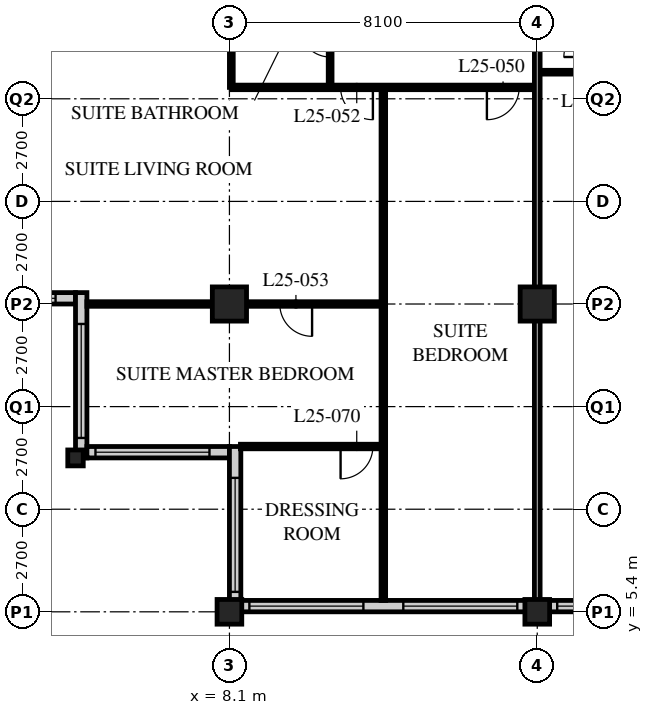
"""IFC4 building model, lengths in metres.
Left out: names, types, materials, properties, quantities, classifications, styles, units other than length and angle.
Written with IfcOpenShell. Run it as: python <this file> out.ifc"""

import sys

from ifc_helpers import new_model, si_unit, direction, frame, frame_2d, origin, origin_2d, place, context, subcontext, project, spatial, rectangle, hollow_rectangle, i_section, extrude, element, fill, save


model = new_model("IFC4")
c1 = context("Model", 3, precision=1e-05, world=origin(), true_north=direction((0.0, 1.0)))
c2 = subcontext(c1, "Body", "Model", "MODEL_VIEW")
j1 = project(units=[si_unit("LENGTHUNIT", "METRE"), si_unit("PLANEANGLEUNIT", "RADIAN")], contexts=[c1])
p1 = place(None, origin())
s1 = spatial("IfcSite", under=j1, at=p1, CompositionType="ELEMENT")
p2 = place(p1, origin())
s2 = spatial("IfcBuilding", under=s1, at=p2, CompositionType="ELEMENT")
p3 = place(p2, frame((0.0, 0.0, 103.4)))
s3 = spatial("IfcBuildingStorey", under=s2, at=p3, CompositionType="ELEMENT", Elevation=103.4)
p4 = place(p3, frame((4.05, 9.45, 0.0), z_axis=(0.0, 0.0, 1.0), x_axis=(1.0, 0.0, 0.0)))
e1 = element("IfcColumn", 1, at=p4, inside=s3, PredefinedType="COLUMN", context=c2, shape_type="SweptSolid", body=[
    extrude(i_section(OverallWidth=0.407, OverallDepth=0.419, WebThickness=0.031, FlangeThickness=0.049, FilletRadius=0.015, at=origin_2d()), origin(), (0.0, 0.0, 1.0), 3.4),
])
p5 = place(p3, frame((8.1, 5.4, 0.0), z_axis=(0.0, 0.0, 1.0), x_axis=(1.0, 0.0, 0.0)))
e2 = element("IfcColumn", 2, at=p5, inside=s3, PredefinedType="COLUMN", context=c2, shape_type="SweptSolid", body=[
    extrude(hollow_rectangle(XDim=0.65, YDim=0.65, WallThickness=0.055, at=origin_2d()), origin(), (0.0, 0.0, 1.0), 3.4),
])
p6 = place(p3, frame((8.1, 13.5, 0.0), z_axis=(0.0, 0.0, 1.0), x_axis=(1.0, 0.0, 0.0)))
e3 = element("IfcColumn", 3, at=p6, inside=s3, PredefinedType="COLUMN", context=c2, shape_type="SweptSolid", body=[
    extrude(hollow_rectangle(XDim=0.9, YDim=0.9, WallThickness=0.1, at=origin_2d()), origin(), (0.0, 0.0, 1.0), 3.4),
])
p7 = place(p3, frame((16.2, 5.4, 0.0), z_axis=(0.0, 0.0, 1.0), x_axis=(1.0, 0.0, 0.0)))
e4 = element("IfcColumn", 4, at=p7, inside=s3, PredefinedType="COLUMN", context=c2, shape_type="SweptSolid", body=[
    extrude(hollow_rectangle(XDim=0.65, YDim=0.65, WallThickness=0.055, at=origin_2d()), origin(), (0.0, 0.0, 1.0), 3.4),
])
p8 = place(p3, frame((16.2, 13.5, 0.0), z_axis=(0.0, 0.0, 1.0), x_axis=(1.0, 0.0, 0.0)))
e5 = element("IfcColumn", 5, at=p8, inside=s3, PredefinedType="COLUMN", context=c2, shape_type="SweptSolid", body=[
    extrude(hollow_rectangle(XDim=0.9, YDim=0.9, WallThickness=0.1, at=origin_2d()), origin(), (0.0, 0.0, 1.0), 3.4),
])
p9 = place(p3, frame((8.4, 5.55, 0.0), z_axis=(0.0, 0.0, 1.0), x_axis=(1.0, 0.0, 0.0)))
e6 = element("IfcWall", 6, at=p9, inside=s3, PredefinedType="SOLIDWALL", context=c2, shape_type="SweptSolid", body=[
    extrude(rectangle(XDim=40.2, YDim=0.3, at=frame_2d((20.1, 0.0))), origin(), (0.0, 0.0, 1.0), 3.19),
])
p10 = place(p9, frame((0.225, 0.0, 0.9)))
e7 = element("IfcOpeningElement", 7, at=p10, cuts=e6, PredefinedType="OPENING", context=c2, shape_type="SweptSolid", body=[
    extrude(rectangle(XDim=3.0, YDim=2.0, at=frame_2d((1.5, 1.0))), frame((0.0, 0.16, 0.0), z_axis=(0.0, -1.0, 0.0), x_axis=(1.0, 0.0, 0.0)), (0.0, 0.0, 1.0), 0.32),
])
p11 = place(p9, frame((4.275, 0.0, 0.9)))
e8 = element("IfcOpeningElement", 8, at=p11, cuts=e6, PredefinedType="OPENING", context=c2, shape_type="SweptSolid", body=[
    extrude(rectangle(XDim=3.0, YDim=2.0, at=frame_2d((1.5, 1.0))), frame((0.0, 0.16, 0.0), z_axis=(0.0, -1.0, 0.0), x_axis=(1.0, 0.0, 0.0)), (0.0, 0.0, 1.0), 0.32),
])
p12 = place(p9, frame((8.325, 0.0, 0.9)))
e9 = element("IfcOpeningElement", 9, at=p12, cuts=e6, PredefinedType="OPENING", context=c2, shape_type="SweptSolid", body=[
    extrude(rectangle(XDim=3.0, YDim=2.0, at=frame_2d((1.5, 1.0))), frame((0.0, 0.16, 0.0), z_axis=(0.0, -1.0, 0.0), x_axis=(1.0, 0.0, 0.0)), (0.0, 0.0, 1.0), 0.32),
])
p13 = place(p9, frame((12.375, 0.0, 0.9)))
e10 = element("IfcOpeningElement", 10, at=p13, cuts=e6, PredefinedType="OPENING", context=c2, shape_type="SweptSolid", body=[
    extrude(rectangle(XDim=3.0, YDim=2.0, at=frame_2d((1.5, 1.0))), frame((0.0, 0.16, 0.0), z_axis=(0.0, -1.0, 0.0), x_axis=(1.0, 0.0, 0.0)), (0.0, 0.0, 1.0), 0.32),
])
p14 = place(p9, frame((16.425, 0.0, 0.9)))
e11 = element("IfcOpeningElement", 11, at=p14, cuts=e6, PredefinedType="OPENING", context=c2, shape_type="SweptSolid", body=[
    extrude(rectangle(XDim=3.0, YDim=2.0, at=frame_2d((1.5, 1.0))), frame((0.0, 0.16, 0.0), z_axis=(0.0, -1.0, 0.0), x_axis=(1.0, 0.0, 0.0)), (0.0, 0.0, 1.0), 0.32),
])
p15 = place(p9, frame((20.475, 0.0, 0.9)))
e12 = element("IfcOpeningElement", 12, at=p15, cuts=e6, PredefinedType="OPENING", context=c2, shape_type="SweptSolid", body=[
    extrude(rectangle(XDim=3.0, YDim=2.0, at=frame_2d((1.5, 1.0))), frame((0.0, 0.16, 0.0), z_axis=(0.0, -1.0, 0.0), x_axis=(1.0, 0.0, 0.0)), (0.0, 0.0, 1.0), 0.32),
])
p16 = place(p9, frame((24.525, 0.0, 0.9)))
e13 = element("IfcOpeningElement", 13, at=p16, cuts=e6, PredefinedType="OPENING", context=c2, shape_type="SweptSolid", body=[
    extrude(rectangle(XDim=3.0, YDim=2.0, at=frame_2d((1.5, 1.0))), frame((0.0, 0.16, 0.0), z_axis=(0.0, -1.0, 0.0), x_axis=(1.0, 0.0, 0.0)), (0.0, 0.0, 1.0), 0.32),
])
p17 = place(p9, frame((28.575, 0.0, 0.9)))
e14 = element("IfcOpeningElement", 14, at=p17, cuts=e6, PredefinedType="OPENING", context=c2, shape_type="SweptSolid", body=[
    extrude(rectangle(XDim=3.0, YDim=2.0, at=frame_2d((1.5, 1.0))), frame((0.0, 0.16, 0.0), z_axis=(0.0, -1.0, 0.0), x_axis=(1.0, 0.0, 0.0)), (0.0, 0.0, 1.0), 0.32),
])
p18 = place(p9, frame((32.625, 0.0, 0.9)))
e15 = element("IfcOpeningElement", 15, at=p18, cuts=e6, PredefinedType="OPENING", context=c2, shape_type="SweptSolid", body=[
    extrude(rectangle(XDim=3.0, YDim=2.0, at=frame_2d((1.5, 1.0))), frame((0.0, 0.16, 0.0), z_axis=(0.0, -1.0, 0.0), x_axis=(1.0, 0.0, 0.0)), (0.0, 0.0, 1.0), 0.32),
])
p19 = place(p9, frame((36.675, 0.0, 0.9)))
e16 = element("IfcOpeningElement", 16, at=p19, cuts=e6, PredefinedType="OPENING", context=c2, shape_type="SweptSolid", body=[
    extrude(rectangle(XDim=3.0, YDim=2.0, at=frame_2d((1.5, 1.0))), frame((0.0, 0.16, 0.0), z_axis=(0.0, -1.0, 0.0), x_axis=(1.0, 0.0, 0.0)), (0.0, 0.0, 1.0), 0.32),
])
p20 = place(p3, frame((0.3, 13.65, 0.0), z_axis=(0.0, 0.0, 1.0), x_axis=(1.0, 0.0, 0.0)))
e17 = element("IfcWall", 17, at=p20, inside=s3, PredefinedType="SOLIDWALL", context=c2, shape_type="SweptSolid", body=[
    extrude(rectangle(XDim=3.75, YDim=0.3, at=frame_2d((1.875, 0.0))), origin(), (0.0, 0.0, 1.0), 3.19),
])
p21 = place(p20, frame((0.225, 0.0, 0.9)))
e18 = element("IfcOpeningElement", 18, at=p21, cuts=e17, PredefinedType="OPENING", context=c2, shape_type="SweptSolid", body=[
    extrude(rectangle(XDim=3.0, YDim=1.5, at=frame_2d((1.5, 0.75))), frame((0.0, 0.16, 0.0), z_axis=(0.0, -1.0, 0.0), x_axis=(1.0, 0.0, 0.0)), (0.0, 0.0, 1.0), 0.32),
])
p22 = place(p3, frame((4.2, 13.8, 0.0), z_axis=(0.0, 0.0, 1.0), x_axis=(0.0, -1.0, 0.0)))
e19 = element("IfcWall", 19, at=p22, inside=s3, PredefinedType="SOLIDWALL", context=c2, shape_type="SweptSolid", body=[
    extrude(rectangle(XDim=4.35, YDim=0.3, at=frame_2d((2.175, 0.0))), origin(), (0.0, 0.0, 1.0), 3.19),
])
p23 = place(p22, frame((0.825, 0.0, 0.9)))
e20 = element("IfcOpeningElement", 20, at=p23, cuts=e19, PredefinedType="OPENING", context=c2, shape_type="SweptSolid", body=[
    extrude(rectangle(XDim=3.0, YDim=1.5, at=frame_2d((1.5, 0.75))), frame((0.0, 0.16, 0.0), z_axis=(0.0, -1.0, 0.0), x_axis=(1.0, 0.0, 0.0)), (0.0, 0.0, 1.0), 0.32),
])
p24 = place(p3, frame((4.35, 9.6, 0.0), z_axis=(0.0, 0.0, 1.0), x_axis=(1.0, 0.0, 0.0)))
e21 = element("IfcWall", 21, at=p24, inside=s3, PredefinedType="SOLIDWALL", context=c2, shape_type="SweptSolid", body=[
    extrude(rectangle(XDim=3.75, YDim=0.3, at=frame_2d((1.875, 0.0))), origin(), (0.0, 0.0, 1.0), 3.19),
])
p25 = place(p24, frame((0.225, 0.0, 0.9)))
e22 = element("IfcOpeningElement", 22, at=p25, cuts=e21, PredefinedType="OPENING", context=c2, shape_type="SweptSolid", body=[
    extrude(rectangle(XDim=3.0, YDim=1.5, at=frame_2d((1.5, 0.75))), frame((0.0, 0.16, 0.0), z_axis=(0.0, -1.0, 0.0), x_axis=(1.0, 0.0, 0.0)), (0.0, 0.0, 1.0), 0.32),
])
p26 = place(p3, frame((8.25, 9.75, 0.0), z_axis=(0.0, 0.0, 1.0), x_axis=(0.0, -1.0, 0.0)))
e23 = element("IfcWall", 23, at=p26, inside=s3, PredefinedType="SOLIDWALL", context=c2, shape_type="SweptSolid", body=[
    extrude(rectangle(XDim=4.35, YDim=0.3, at=frame_2d((2.175, 0.0))), origin(), (0.0, 0.0, 1.0), 3.19),
])
p27 = place(p26, frame((0.825, 0.0, 0.9)))
e24 = element("IfcOpeningElement", 24, at=p27, cuts=e23, PredefinedType="OPENING", context=c2, shape_type="SweptSolid", body=[
    extrude(rectangle(XDim=3.0, YDim=1.5, at=frame_2d((1.5, 0.75))), frame((0.0, 0.16, 0.0), z_axis=(0.0, -1.0, 0.0), x_axis=(1.0, 0.0, 0.0)), (0.0, 0.0, 1.0), 0.32),
])
p28 = place(p3, frame((16.2, 19.6, 0.0), z_axis=(0.0, 0.0, 1.0), x_axis=(1.0, 0.0, 0.0)))
e25 = element("IfcWall", 25, at=p28, inside=s3, PredefinedType="PARTITIONING", context=c2, shape_type="SweptSolid", body=[
    extrude(rectangle(XDim=1.5, YDim=0.1, at=frame_2d((0.75, 0.0))), origin(), (0.0, 0.0, 1.0), 3.19),
])
p29 = place(p3, frame((10.75, 21.6, 0.0), z_axis=(0.0, 0.0, 1.0), x_axis=(0.0, -1.0, 0.0)))
e26 = element("IfcWall", 26, at=p29, inside=s3, PredefinedType="PARTITIONING", context=c2, shape_type="SweptSolid", body=[
    extrude(rectangle(XDim=2.4, YDim=0.1, at=frame_2d((1.2, 0.0))), origin(), (0.0, 0.0, 1.0), 3.19),
])
p30 = place(p29, frame((0.8, 0.0, 0.0)))
e27 = element("IfcOpeningElement", 27, at=p30, cuts=e26, PredefinedType="OPENING", context=c2, shape_type="SweptSolid", body=[
    extrude(rectangle(XDim=0.8, YDim=2.1, at=frame_2d((0.4, 1.05))), frame((0.0, 0.06, 0.0), z_axis=(0.0, -1.0, 0.0), x_axis=(1.0, 0.0, 0.0)), (0.0, 0.0, 1.0), 0.12),
])
p31 = place(p3, frame((8.15, 21.6, 0.0), z_axis=(0.0, 0.0, 1.0), x_axis=(0.0, -1.0, 0.0)))
e28 = element("IfcWall", 28, at=p31, inside=s3, PredefinedType="PARTITIONING", context=c2, shape_type="SweptSolid", body=[
    extrude(rectangle(XDim=2.4, YDim=0.1, at=frame_2d((1.2, 0.0))), origin(), (0.0, 0.0, 1.0), 2.578),
])
p32 = place(p3, frame((8.15, 19.2, 0.0), z_axis=(0.0, 0.0, 1.0), x_axis=(1.0, 0.0, 0.0)))
e29 = element("IfcWall", 29, at=p32, inside=s3, PredefinedType="PARTITIONING", context=c2, shape_type="SweptSolid", body=[
    extrude(rectangle(XDim=8.05, YDim=0.12, at=frame_2d((4.025, 0.0))), origin(), (0.0, 0.0, 1.0), 3.19),
])
p33 = place(p32, frame((6.725, 0.0, 0.0)))
e30 = element("IfcOpeningElement", 30, at=p33, cuts=e29, PredefinedType="OPENING", context=c2, shape_type="SweptSolid", body=[
    extrude(rectangle(XDim=0.85, YDim=2.1, at=frame_2d((0.425, 1.05))), frame((0.0, 0.07, 0.0), z_axis=(0.0, -1.0, 0.0), x_axis=(1.0, 0.0, 0.0)), (0.0, 0.0, 1.0), 0.14),
])
p34 = place(p32, frame((2.875, 0.0, 0.0)))
e31 = element("IfcOpeningElement", 31, at=p34, cuts=e29, PredefinedType="OPENING", context=c2, shape_type="SweptSolid", body=[
    extrude(rectangle(XDim=0.85, YDim=2.1, at=frame_2d((0.425, 1.05))), frame((0.0, 0.07, 0.0), z_axis=(0.0, -1.0, 0.0), x_axis=(1.0, 0.0, 0.0)), (0.0, 0.0, 1.0), 0.14),
])
p35 = place(p3, frame((12.15, 19.2, 0.0), z_axis=(0.0, 0.0, 1.0), x_axis=(0.0, -1.0, 0.0)))
e32 = element("IfcWall", 32, at=p35, inside=s3, PredefinedType="PARTITIONING", context=c2, shape_type="SweptSolid", body=[
    extrude(rectangle(XDim=13.5, YDim=0.12, at=frame_2d((6.75, 0.0))), origin(), (0.0, 0.0, 1.0), 3.19),
])
p36 = place(p3, frame((12.15, 13.5, 0.0), z_axis=(0.0, 0.0, 1.0), x_axis=(-1.0, 0.0, 0.0)))
e33 = element("IfcWall", 33, at=p36, inside=s3, PredefinedType="PARTITIONING", context=c2, shape_type="SweptSolid", body=[
    extrude(rectangle(XDim=7.8, YDim=0.12, at=frame_2d((3.9, 0.0))), origin(), (0.0, 0.0, 1.0), 2.578),
])
p37 = place(p36, frame((1.875, 0.0, 0.0)))
e34 = element("IfcOpeningElement", 34, at=p37, cuts=e33, PredefinedType="OPENING", context=c2, shape_type="SweptSolid", body=[
    extrude(rectangle(XDim=0.85, YDim=2.1, at=frame_2d((0.425, 1.05))), frame((0.0, 0.07, 0.0), z_axis=(0.0, -1.0, 0.0), x_axis=(1.0, 0.0, 0.0)), (0.0, 0.0, 1.0), 0.14),
])
p38 = place(p3, frame((16.2, 21.6, 0.0), z_axis=(0.0, 0.0, 1.0), x_axis=(0.0, -1.0, 0.0)))
e35 = element("IfcWall", 35, at=p38, inside=s3, PredefinedType="PARTITIONING", context=c2, shape_type="SweptSolid", body=[
    extrude(rectangle(XDim=15.9, YDim=0.15, at=frame_2d((7.95, 0.0))), origin(), (0.0, 0.0, 1.0), 2.578),
])
p39 = place(p3, frame((8.39, 9.75, 0.0), z_axis=(0.0, 0.0, 1.0), x_axis=(1.0, 0.0, 0.0)))
e36 = element("IfcWall", 36, at=p39, inside=s3, PredefinedType="PARTITIONING", context=c2, shape_type="SweptSolid", body=[
    extrude(rectangle(XDim=3.76, YDim=0.12, at=frame_2d((1.88, 0.0))), origin(), (0.0, 0.0, 1.0), 3.19),
])
p40 = place(p39, frame((2.635, 0.0, 0.0)))
e37 = element("IfcOpeningElement", 37, at=p40, cuts=e36, PredefinedType="OPENING", context=c2, shape_type="SweptSolid", body=[
    extrude(rectangle(XDim=0.85, YDim=2.1, at=frame_2d((0.425, 1.05))), frame((0.0, 0.07, 0.0), z_axis=(0.0, -1.0, 0.0), x_axis=(1.0, 0.0, 0.0)), (0.0, 0.0, 1.0), 0.14),
])
p41 = place(p10, origin())
e38 = element("IfcWindow", 38, at=p41, inside=s3, PartitioningType="SINGLE_PANEL", PredefinedType="WINDOW", context=c2, shape_type="SweptSolid", body=[
    extrude(rectangle(XDim=3.0, YDim=2.0, at=frame_2d((1.5, 1.0))), frame((0.0, 0.03, 0.0), z_axis=(0.0, -1.0, 0.0), x_axis=(1.0, 0.0, 0.0)), (0.0, 0.0, 1.0), 0.06),
])
fill(e7, e38)
p42 = place(p11, origin())
e39 = element("IfcWindow", 39, at=p42, inside=s3, PartitioningType="SINGLE_PANEL", PredefinedType="WINDOW", context=c2, shape_type="SweptSolid", body=[
    extrude(rectangle(XDim=3.0, YDim=2.0, at=frame_2d((1.5, 1.0))), frame((0.0, 0.03, 0.0), z_axis=(0.0, -1.0, 0.0), x_axis=(1.0, 0.0, 0.0)), (0.0, 0.0, 1.0), 0.06),
])
fill(e8, e39)
p43 = place(p12, origin())
e40 = element("IfcWindow", 40, at=p43, inside=s3, PartitioningType="SINGLE_PANEL", PredefinedType="WINDOW", context=c2, shape_type="SweptSolid", body=[
    extrude(rectangle(XDim=3.0, YDim=2.0, at=frame_2d((1.5, 1.0))), frame((0.0, 0.03, 0.0), z_axis=(0.0, -1.0, 0.0), x_axis=(1.0, 0.0, 0.0)), (0.0, 0.0, 1.0), 0.06),
])
fill(e9, e40)
p44 = place(p21, origin())
e41 = element("IfcWindow", 41, at=p44, inside=s3, PartitioningType="SINGLE_PANEL", PredefinedType="WINDOW", context=c2, shape_type="SweptSolid", body=[
    extrude(rectangle(XDim=3.0, YDim=1.5, at=frame_2d((1.5, 0.75))), frame((0.0, 0.03, 0.0), z_axis=(0.0, -1.0, 0.0), x_axis=(1.0, 0.0, 0.0)), (0.0, 0.0, 1.0), 0.06),
])
fill(e18, e41)
p45 = place(p23, origin())
e42 = element("IfcWindow", 42, at=p45, inside=s3, PartitioningType="SINGLE_PANEL", PredefinedType="WINDOW", context=c2, shape_type="SweptSolid", body=[
    extrude(rectangle(XDim=3.0, YDim=1.5, at=frame_2d((1.5, 0.75))), frame((0.0, 0.03, 0.0), z_axis=(0.0, -1.0, 0.0), x_axis=(1.0, 0.0, 0.0)), (0.0, 0.0, 1.0), 0.06),
])
fill(e20, e42)
p46 = place(p25, origin())
e43 = element("IfcWindow", 43, at=p46, inside=s3, PartitioningType="SINGLE_PANEL", PredefinedType="WINDOW", context=c2, shape_type="SweptSolid", body=[
    extrude(rectangle(XDim=3.0, YDim=1.5, at=frame_2d((1.5, 0.75))), frame((0.0, 0.03, 0.0), z_axis=(0.0, -1.0, 0.0), x_axis=(1.0, 0.0, 0.0)), (0.0, 0.0, 1.0), 0.06),
])
fill(e22, e43)
p47 = place(p27, origin())
e44 = element("IfcWindow", 44, at=p47, inside=s3, PartitioningType="SINGLE_PANEL", PredefinedType="WINDOW", context=c2, shape_type="SweptSolid", body=[
    extrude(rectangle(XDim=3.0, YDim=1.5, at=frame_2d((1.5, 0.75))), frame((0.0, 0.03, 0.0), z_axis=(0.0, -1.0, 0.0), x_axis=(1.0, 0.0, 0.0)), (0.0, 0.0, 1.0), 0.06),
])
fill(e24, e44)
p48 = place(p33, origin())
e45 = element("IfcDoor", 45, at=p48, inside=s3, OperationType="SINGLE_SWING_RIGHT", PredefinedType="DOOR", context=c2, shape_type="SweptSolid", body=[
    extrude(rectangle(XDim=0.85, YDim=2.1, at=frame_2d((0.425, 1.05))), frame((0.0, 0.025, 0.0), z_axis=(0.0, -1.0, 0.0), x_axis=(1.0, 0.0, 0.0)), (0.0, 0.0, 1.0), 0.05),
])
fill(e30, e45)
p49 = place(p30, origin())
e46 = element("IfcDoor", 46, at=p49, inside=s3, OperationType="SINGLE_SWING_RIGHT", PredefinedType="DOOR", context=c2, shape_type="SweptSolid", body=[
    extrude(rectangle(XDim=0.8, YDim=2.1, at=frame_2d((0.4, 1.05))), frame((0.0, 0.025, 0.0), z_axis=(0.0, -1.0, 0.0), x_axis=(1.0, 0.0, 0.0)), (0.0, 0.0, 1.0), 0.05),
])
fill(e27, e46)
p50 = place(p34, origin())
e47 = element("IfcDoor", 47, at=p50, inside=s3, OperationType="SINGLE_SWING_LEFT", PredefinedType="DOOR", context=c2, shape_type="SweptSolid", body=[
    extrude(rectangle(XDim=0.85, YDim=2.1, at=frame_2d((0.425, 1.05))), frame((0.0, 0.025, 0.0), z_axis=(0.0, -1.0, 0.0), x_axis=(1.0, 0.0, 0.0)), (0.0, 0.0, 1.0), 0.05),
])
fill(e31, e47)
p51 = place(p37, origin())
e48 = element("IfcDoor", 48, at=p51, inside=s3, OperationType="SINGLE_SWING_LEFT", PredefinedType="DOOR", context=c2, shape_type="SweptSolid", body=[
    extrude(rectangle(XDim=0.85, YDim=2.1, at=frame_2d((0.425, 1.05))), frame((0.0, 0.025, 0.0), z_axis=(0.0, -1.0, 0.0), x_axis=(1.0, 0.0, 0.0)), (0.0, 0.0, 1.0), 0.05),
])
fill(e34, e48)
p52 = place(p40, origin())
e49 = element("IfcDoor", 49, at=p52, inside=s3, OperationType="SINGLE_SWING_RIGHT", PredefinedType="DOOR", context=c2, shape_type="SweptSolid", body=[
    extrude(rectangle(XDim=0.85, YDim=2.1, at=frame_2d((0.425, 1.05))), frame((0.0, 0.025, 0.0), z_axis=(0.0, -1.0, 0.0), x_axis=(1.0, 0.0, 0.0)), (0.0, 0.0, 1.0), 0.05),
])
fill(e37, e49)
save(model, sys.argv[1])
